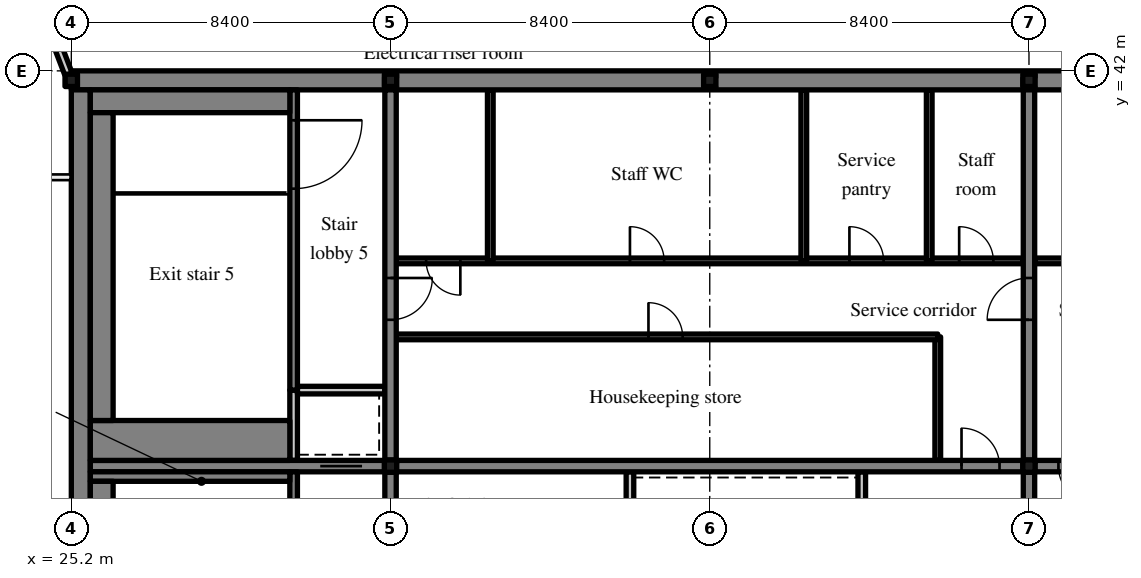
"""IFC4 building model, lengths in metres.
Left out: names, types, materials, properties, quantities, classifications, styles, units other than length and angle.
Written with IfcOpenShell. Run it as: python <this file> out.ifc"""

import sys

from ifc_helpers import new_model, si_unit, direction, frame, frame_2d, origin, origin_2d, place, context, subcontext, project, spatial, rectangle, hollow_circle, extrude, source, transform, mapped, element, fill, save


model = new_model("IFC4")
c1 = context("Model", 3, precision=1e-05, world=origin(), true_north=direction((0.0, 1.0)))
c2 = subcontext(c1, "Body", "Model", "MODEL_VIEW")
j1 = project(units=[si_unit("LENGTHUNIT", "METRE"), si_unit("PLANEANGLEUNIT", "RADIAN")], contexts=[c1])
p1 = place(None, origin())
s1 = spatial("IfcSite", under=j1, at=p1, CompositionType="ELEMENT")
p2 = place(p1, origin())
s2 = spatial("IfcBuilding", under=s1, at=p2, CompositionType="ELEMENT")
p3 = place(p2, frame((0.0, 0.0, 329.7)))
s3 = spatial("IfcBuildingStorey", under=s2, at=p3, CompositionType="ELEMENT", Elevation=329.7)
m1 = source(origin(), c2, "Body", "SweptSolid", [
    extrude(rectangle(XDim=50.4, YDim=0.5, at=frame_2d((25.2, 0.0))), origin(), (0.0, 0.0, 1.0), 4.72),
])
p4 = place(p3, frame((25.2, 41.75, 0.0), z_axis=(0.0, 0.0, 1.0), x_axis=(1.0, 0.0, 0.0)))
e1 = element("IfcWall", 1, at=p4, inside=s3, PredefinedType="SHEAR", context=c2, shape_type="MappedRepresentation", body=[
    mapped(m1, transform((0.0, 0.0, 0.0), scale=1.0)),
])
m2 = source(origin(), c2, "Body", "SweptSolid", [
    extrude(rectangle(XDim=19.0, YDim=0.5, at=frame_2d((9.5, 0.0))), origin(), (0.0, 0.0, 1.0), 4.72),
])
p5 = place(p3, frame((25.45, 22.5, 0.0), z_axis=(0.0, 0.0, 1.0), x_axis=(0.0, 1.0, 0.0)))
e2 = element("IfcWall", 2, at=p5, inside=s3, PredefinedType="SHEAR", context=c2, shape_type="MappedRepresentation", body=[
    mapped(m2, transform((0.0, 0.0, 0.0), scale=1.0)),
])
m3 = source(origin(), c2, "Body", "SweptSolid", [
    extrude(rectangle(XDim=19.0, YDim=0.3, at=frame_2d((9.5, 0.0))), origin(), (0.0, 0.0, 1.0), 4.72),
])
p6 = place(p3, frame((33.6, 22.5, 0.0), z_axis=(0.0, 0.0, 1.0), x_axis=(0.0, 1.0, 0.0)))
e3 = element("IfcWall", 3, at=p6, inside=s3, PredefinedType="SHEAR", context=c2, shape_type="MappedRepresentation", body=[
    mapped(m3, transform((0.0, 0.0, 0.0), scale=1.0)),
])
m4 = source(origin(), c2, "Body", "SweptSolid", [
    extrude(rectangle(XDim=1.1, YDim=2.1, at=frame_2d((0.55, 1.05))), frame((0.0, 0.16, 0.0), z_axis=(0.0, -1.0, 0.0), x_axis=(1.0, 0.0, 0.0)), (0.0, 0.0, 1.0), 0.32),
])
p7 = place(p6, frame((12.95, 0.0, 0.0)))
e4 = element("IfcOpeningElement", 4, at=p7, cuts=e3, PredefinedType="OPENING", context=c2, shape_type="MappedRepresentation", body=[
    mapped(m4, transform((0.0, 0.0, 0.0), scale=1.0)),
])
p8 = place(p3, frame((50.4, 22.5, 0.0), z_axis=(0.0, 0.0, 1.0), x_axis=(0.0, 1.0, 0.0)))
e5 = element("IfcWall", 5, at=p8, inside=s3, PredefinedType="SHEAR", context=c2, shape_type="MappedRepresentation", body=[
    mapped(m3, transform((0.0, 0.0, 0.0), scale=1.0)),
])
p9 = place(p8, frame((12.95, 0.0, 0.0)))
e6 = element("IfcOpeningElement", 6, at=p9, cuts=e5, PredefinedType="OPENING", context=c2, shape_type="MappedRepresentation", body=[
    mapped(m4, transform((0.0, 0.0, 0.0), scale=1.0)),
])
m5 = source(origin(), c2, "Body", "SweptSolid", [
    extrude(rectangle(XDim=7.75, YDim=0.3, at=frame_2d((3.875, 0.0))), origin(), (0.0, 0.0, 1.0), 4.72),
])
p10 = place(p3, frame((25.7, 31.6, 0.0), z_axis=(0.0, 0.0, 1.0), x_axis=(1.0, 0.0, 0.0)))
e7 = element("IfcWall", 7, at=p10, inside=s3, PredefinedType="SHEAR", context=c2, shape_type="MappedRepresentation", body=[
    mapped(m5, transform((0.0, 0.0, 0.0), scale=1.0)),
])
p11 = place(p10, frame((6.05, 0.0, 0.0)))
e8 = element("IfcOpeningElement", 8, at=p11, cuts=e7, PredefinedType="OPENING", context=c2, shape_type="MappedRepresentation", body=[
    mapped(m4, transform((0.0, 0.0, 0.0), scale=1.0)),
])
m6 = source(origin(), c2, "Body", "SweptSolid", [
    extrude(rectangle(XDim=16.5, YDim=0.3, at=frame_2d((8.25, 0.0))), origin(), (0.0, 0.0, 1.0), 4.72),
])
p12 = place(p3, frame((33.75, 31.6, 0.0), z_axis=(0.0, 0.0, 1.0), x_axis=(1.0, 0.0, 0.0)))
e9 = element("IfcWall", 9, at=p12, inside=s3, PredefinedType="SHEAR", context=c2, shape_type="MappedRepresentation", body=[
    mapped(m6, transform((0.0, 0.0, 0.0), scale=1.0)),
])
m7 = source(origin(), c2, "Body", "SweptSolid", [
    extrude(rectangle(XDim=1.0, YDim=2.1, at=frame_2d((0.5, 1.05))), frame((0.0, 0.16, 0.0), z_axis=(0.0, -1.0, 0.0), x_axis=(1.0, 0.0, 0.0)), (0.0, 0.0, 1.0), 0.32),
])
p13 = place(p12, frame((14.875, 0.0, 0.0)))
e10 = element("IfcOpeningElement", 10, at=p13, cuts=e9, PredefinedType="OPENING", context=c2, shape_type="MappedRepresentation", body=[
    mapped(m7, transform((0.0, 0.0, 0.0), scale=1.0)),
])
p14 = place(p3, frame((50.55, 31.6, 0.0), z_axis=(0.0, 0.0, 1.0), x_axis=(1.0, 0.0, 0.0)))
e11 = element("IfcWall", 11, at=p14, inside=s3, PredefinedType="SHEAR", context=c2, shape_type="MappedRepresentation", body=[
    mapped(m6, transform((0.0, 0.0, 0.0), scale=1.0)),
])
p15 = place(p14, frame((0.625, 0.0, 0.0)))
e12 = element("IfcOpeningElement", 12, at=p15, cuts=e11, PredefinedType="OPENING", context=c2, shape_type="MappedRepresentation", body=[
    mapped(m7, transform((0.0, 0.0, 0.0), scale=1.0)),
])
m8 = source(origin(), c2, "Body", "SweptSolid", [
    extrude(hollow_circle(Radius=0.162, WallThickness=0.012, at=origin_2d()), origin(), (0.0, 0.0, 1.0), 4.4),
])
for number, where, z_axis, x_axis in (
    (13, (25.2, 41.75, 5.0), (0.0, 0.0, 1.0), (1.0, 0.0, 0.0)),
    (14, (33.6, 41.75, 5.0), (0.0, 0.0, 1.0), (1.0, 0.0, 0.0)),
    (15, (42.0, 41.75, 5.0), (0.0, 0.0, 1.0), (1.0, 0.0, 0.0)),
    (16, (50.4, 41.75, 5.0), (0.0, 0.0, 1.0), (1.0, 0.0, 0.0)),
    (17, (33.6, 31.6, 5.0), (0.0, 0.0, 1.0), (1.0, 0.0, 0.0)),
    (18, (50.4, 31.6, 5.0), (0.0, 0.0, 1.0), (1.0, 0.0, 0.0)),
):
    element("IfcColumn", number, at=place(p3, frame(where, z_axis=z_axis, x_axis=x_axis)), inside=s3, PredefinedType="COLUMN", context=c2, shape_type="MappedRepresentation", body=[
        mapped(m8, transform((0.0, 0.0, 0.0), scale=1.0)),
    ])
m9 = source(origin(), c2, "Body", "SweptSolid", [
    extrude(rectangle(XDim=1.655, YDim=0.2, at=frame_2d((0.827, 0.0))), origin(), (0.0, 0.0, 1.0), 1.1),
])
p16 = place(p3, frame((24.539, 43.445, 0.0), z_axis=(0.0, 0.0, 1.0), x_axis=(0.357614417071, -0.933869331707, 0.0)))
e19 = element("IfcWall", 19, at=p16, inside=s3, PredefinedType="PARAPET", context=c2, shape_type="MappedRepresentation", body=[
    mapped(m9, transform((0.0, 0.0, 0.0), scale=1.0)),
])
m10 = source(origin(), c2, "Body", "SweptSolid", [
    extrude(rectangle(XDim=8.95, YDim=0.2, at=frame_2d((4.475, 0.0))), origin(), (0.0, 0.0, 1.0), 4.72),
])
p17 = place(p3, frame((39.9, 22.5, 0.0), z_axis=(0.0, 0.0, 1.0), x_axis=(0.0, 1.0, 0.0)))
e20 = element("IfcWall", 20, at=p17, inside=s3, PredefinedType="PARTITIONING", context=c2, shape_type="MappedRepresentation", body=[
    mapped(m10, transform((0.0, 0.0, 0.0), scale=1.0)),
])
m11 = source(origin(), c2, "Body", "SweptSolid", [
    extrude(rectangle(XDim=0.9, YDim=2.1, at=frame_2d((0.45, 1.05))), frame((0.0, 0.11, 0.0), z_axis=(0.0, -1.0, 0.0), x_axis=(1.0, 0.0, 0.0)), (0.0, 0.0, 1.0), 0.22),
])
p18 = place(p17, frame((4.05, 0.0, 0.0)))
e21 = element("IfcOpeningElement", 21, at=p18, cuts=e20, PredefinedType="OPENING", context=c2, shape_type="MappedRepresentation", body=[
    mapped(m11, transform((0.0, 0.0, 0.0), scale=1.0)),
])
m12 = source(origin(), c2, "Body", "SweptSolid", [
    extrude(rectangle(XDim=2.65, YDim=0.2, at=frame_2d((1.325, 0.0))), origin(), (0.0, 0.0, 1.0), 4.72),
])
p19 = place(p3, frame((46.0, 28.8, 0.0), z_axis=(0.0, 0.0, 1.0), x_axis=(0.0, 1.0, 0.0)))
e22 = element("IfcWall", 22, at=p19, inside=s3, PredefinedType="SOLIDWALL", context=c2, shape_type="MappedRepresentation", body=[
    mapped(m12, transform((0.0, 0.0, 0.0), scale=1.0)),
])
m13 = source(origin(), c2, "Body", "SweptSolid", [
    extrude(rectangle(XDim=3.25, YDim=0.15, at=frame_2d((1.625, 0.0))), origin(), (0.0, 0.0, 1.0), 4.72),
])
p20 = place(p3, frame((48.0, 31.75, 0.0), z_axis=(0.0, 0.0, 1.0), x_axis=(0.0, 1.0, 0.0)))
e23 = element("IfcWall", 23, at=p20, inside=s3, PredefinedType="PARTITIONING", context=c2, shape_type="MappedRepresentation", body=[
    mapped(m13, transform((0.0, 0.0, 0.0), scale=1.0)),
])
m14 = source(origin(), c2, "Body", "SweptSolid", [
    extrude(rectangle(XDim=14.25, YDim=0.15, at=frame_2d((7.125, 0.0))), origin(), (0.0, 0.0, 1.0), 4.72),
])
p21 = place(p3, frame((33.75, 35.0, 0.0), z_axis=(0.0, 0.0, 1.0), x_axis=(1.0, 0.0, 0.0)))
e24 = element("IfcWall", 24, at=p21, inside=s3, PredefinedType="PARTITIONING", context=c2, shape_type="MappedRepresentation", body=[
    mapped(m14, transform((0.0, 0.0, 0.0), scale=1.0)),
])
m15 = source(origin(), c2, "Body", "SweptSolid", [
    extrude(rectangle(XDim=0.9, YDim=2.1, at=frame_2d((0.45, 1.05))), frame((0.0, 0.085, 0.0), z_axis=(0.0, -1.0, 0.0), x_axis=(1.0, 0.0, 0.0)), (0.0, 0.0, 1.0), 0.17),
])
p22 = place(p21, frame((6.637, 0.0, 0.0)))
e25 = element("IfcOpeningElement", 25, at=p22, cuts=e24, PredefinedType="OPENING", context=c2, shape_type="MappedRepresentation", body=[
    mapped(m15, transform((0.0, 0.0, 0.0), scale=1.0)),
])
m16 = source(origin(), c2, "Body", "SweptSolid", [
    extrude(rectangle(XDim=16.5, YDim=0.15, at=frame_2d((8.25, 0.0))), origin(), (0.0, 0.0, 1.0), 4.72),
])
p23 = place(p3, frame((33.75, 37.0, 0.0), z_axis=(0.0, 0.0, 1.0), x_axis=(1.0, 0.0, 0.0)))
e26 = element("IfcWall", 26, at=p23, inside=s3, PredefinedType="PARTITIONING", context=c2, shape_type="MappedRepresentation", body=[
    mapped(m16, transform((0.0, 0.0, 0.0), scale=1.0)),
])
p24 = place(p23, frame((0.787, 0.0, 0.0)))
e27 = element("IfcOpeningElement", 27, at=p24, cuts=e26, PredefinedType="OPENING", context=c2, shape_type="MappedRepresentation", body=[
    mapped(m15, transform((0.0, 0.0, 0.0), scale=1.0)),
])
p25 = place(p23, frame((6.15, 0.0, 0.0)))
e28 = element("IfcOpeningElement", 28, at=p25, cuts=e26, PredefinedType="OPENING", context=c2, shape_type="MappedRepresentation", body=[
    mapped(m15, transform((0.0, 0.0, 0.0), scale=1.0)),
])
p26 = place(p23, frame((11.925, 0.0, 0.0)))
e29 = element("IfcOpeningElement", 29, at=p26, cuts=e26, PredefinedType="OPENING", context=c2, shape_type="MappedRepresentation", body=[
    mapped(m15, transform((0.0, 0.0, 0.0), scale=1.0)),
])
p27 = place(p23, frame((14.813, 0.0, 0.0)))
e30 = element("IfcOpeningElement", 30, at=p27, cuts=e26, PredefinedType="OPENING", context=c2, shape_type="MappedRepresentation", body=[
    mapped(m15, transform((0.0, 0.0, 0.0), scale=1.0)),
])
m17 = source(origin(), c2, "Body", "SweptSolid", [
    extrude(rectangle(XDim=4.5, YDim=0.15, at=frame_2d((2.25, 0.0))), origin(), (0.0, 0.0, 1.0), 4.72),
])
for number, where, z_axis, x_axis in (
    (31, (36.225, 37.0, 0.0), (0.0, 0.0, 1.0), (0.0, 1.0, 0.0)),
    (32, (44.475, 37.0, 0.0), (0.0, 0.0, 1.0), (0.0, 1.0, 0.0)),
    (33, (47.775, 37.0, 0.0), (0.0, 0.0, 1.0), (0.0, 1.0, 0.0)),
):
    element("IfcWall", number, at=place(p3, frame(where, z_axis=z_axis, x_axis=x_axis)), inside=s3, PredefinedType="PARTITIONING", context=c2, shape_type="MappedRepresentation", body=[
        mapped(m17, transform((0.0, 0.0, 0.0), scale=1.0)),
    ])
p28 = place(p3, frame((67.05, 37.0, 0.0), z_axis=(0.0, 0.0, 1.0), x_axis=(-1.0, 0.0, 0.0)))
e34 = element("IfcWall", 34, at=p28, inside=s3, PredefinedType="PARTITIONING", context=c2, shape_type="MappedRepresentation", body=[
    mapped(m16, transform((0.0, 0.0, 0.0), scale=1.0)),
])
p29 = place(p28, frame((0.788, 0.0, 0.0)))
e35 = element("IfcOpeningElement", 35, at=p29, cuts=e34, PredefinedType="OPENING", context=c2, shape_type="MappedRepresentation", body=[
    mapped(m15, transform((0.0, 0.0, 0.0), scale=1.0)),
])
p30 = place(p28, frame((9.038, 0.0, 0.0)))
e36 = element("IfcOpeningElement", 36, at=p30, cuts=e34, PredefinedType="OPENING", context=c2, shape_type="MappedRepresentation", body=[
    mapped(m15, transform((0.0, 0.0, 0.0), scale=1.0)),
])
m18 = source(origin(), c2, "Body", "SweptSolid", [
    extrude(rectangle(XDim=8.95, YDim=0.2, at=frame_2d((4.475, 0.0))), origin(), (0.0, 0.0, 1.0), 4.72),
])
p31 = place(p3, frame((31.05, 22.5, 0.0), z_axis=(0.0, 0.0, 1.0), x_axis=(0.0, 1.0, 0.0)))
e37 = element("IfcWall", 37, at=p31, inside=s3, PredefinedType="SOLIDWALL", context=c2, shape_type="MappedRepresentation", body=[
    mapped(m18, transform((0.0, 0.0, 0.0), scale=1.0)),
])
m19 = source(origin(), c2, "Body", "SweptSolid", [
    extrude(rectangle(XDim=1.2, YDim=2.1, at=frame_2d((0.6, 1.05))), frame((0.0, 0.11, 0.0), z_axis=(0.0, -1.0, 0.0), x_axis=(1.0, 0.0, 0.0)), (0.0, 0.0, 1.0), 0.22),
])
p32 = place(p31, frame((7.0, 0.0, 0.0)))
e38 = element("IfcOpeningElement", 38, at=p32, cuts=e37, PredefinedType="OPENING", context=c2, shape_type="MappedRepresentation", body=[
    mapped(m19, transform((0.0, 0.0, 0.0), scale=1.0)),
])
m20 = source(origin(), c2, "Body", "SweptSolid", [
    extrude(rectangle(XDim=1.85, YDim=0.2, at=frame_2d((0.925, 0.0))), origin(), (0.0, 0.0, 1.0), 4.72),
])
p33 = place(p3, frame((31.05, 31.75, 0.0), z_axis=(0.0, 0.0, 1.0), x_axis=(0.0, 1.0, 0.0)))
e39 = element("IfcWall", 39, at=p33, inside=s3, PredefinedType="SOLIDWALL", context=c2, shape_type="MappedRepresentation", body=[
    mapped(m20, transform((0.0, 0.0, 0.0), scale=1.0)),
])
m21 = source(origin(), c2, "Body", "SweptSolid", [
    extrude(rectangle(XDim=2.3, YDim=0.2, at=frame_2d((1.15, 0.0))), origin(), (0.0, 0.0, 1.0), 4.72),
])
p34 = place(p3, frame((31.15, 33.6, 0.0), z_axis=(0.0, 0.0, 1.0), x_axis=(1.0, 0.0, 0.0)))
e40 = element("IfcWall", 40, at=p34, inside=s3, PredefinedType="SOLIDWALL", context=c2, shape_type="MappedRepresentation", body=[
    mapped(m21, transform((0.0, 0.0, 0.0), scale=1.0)),
])
m22 = source(origin(), c2, "Body", "SweptSolid", [
    extrude(rectangle(XDim=7.9, YDim=0.2, at=frame_2d((3.95, 0.0))), origin(), (0.0, 0.0, 1.0), 4.72),
])
p35 = place(p3, frame((31.05, 33.6, 0.0), z_axis=(0.0, 0.0, 1.0), x_axis=(0.0, 1.0, 0.0)))
e41 = element("IfcWall", 41, at=p35, inside=s3, PredefinedType="SOLIDWALL", context=c2, shape_type="MappedRepresentation", body=[
    mapped(m22, transform((0.0, 0.0, 0.0), scale=1.0)),
])
m23 = source(origin(), c2, "Body", "SweptSolid", [
    extrude(rectangle(XDim=1.8, YDim=2.1, at=frame_2d((0.9, 1.05))), frame((0.0, 0.11, 0.0), z_axis=(0.0, -1.0, 0.0), x_axis=(1.0, 0.0, 0.0)), (0.0, 0.0, 1.0), 0.22),
])
p36 = place(p35, frame((5.3, 0.0, 0.0)))
e42 = element("IfcOpeningElement", 42, at=p36, cuts=e41, PredefinedType="OPENING", context=c2, shape_type="MappedRepresentation", body=[
    mapped(m23, transform((0.0, 0.0, 0.0), scale=1.0)),
])
m24 = source(origin(), c2, "Body", "SweptSolid", [
    extrude(rectangle(XDim=5.25, YDim=0.25, at=frame_2d((2.625, 0.0))), origin(), (0.0, 0.0, 1.0), 4.72),
])
p37 = place(p3, frame((25.7, 31.325, 0.0), z_axis=(0.0, 0.0, 1.0), x_axis=(1.0, 0.0, 0.0)))
e43 = element("IfcWall", 43, at=p37, inside=s3, PredefinedType="SOLIDWALL", context=c2, shape_type="MappedRepresentation", body=[
    mapped(m24, transform((0.0, 0.0, 0.0), scale=1.0)),
])
m25 = source(origin(), c2, "Body", "SweptSolid", [
    extrude(rectangle(XDim=8.1, YDim=0.6, at=frame_2d((4.05, 0.0))), origin(), (0.0, 0.0, 1.0), 4.72),
])
p38 = place(p3, frame((26.0, 23.1, 0.0), z_axis=(0.0, 0.0, 1.0), x_axis=(0.0, 1.0, 0.0)))
e44 = element("IfcWall", 44, at=p38, inside=s3, PredefinedType="SOLIDWALL", context=c2, shape_type="MappedRepresentation", body=[
    mapped(m25, transform((0.0, 0.0, 0.0), scale=1.0)),
])
m26 = source(origin(), c2, "Body", "SweptSolid", [
    extrude(rectangle(XDim=5.25, YDim=0.6, at=frame_2d((2.625, 0.0))), origin(), (0.0, 0.0, 1.0), 4.72),
])
p39 = place(p3, frame((25.7, 41.2, 0.0), z_axis=(0.0, 0.0, 1.0), x_axis=(1.0, 0.0, 0.0)))
e45 = element("IfcWall", 45, at=p39, inside=s3, PredefinedType="SOLIDWALL", context=c2, shape_type="MappedRepresentation", body=[
    mapped(m26, transform((0.0, 0.0, 0.0), scale=1.0)),
])
m27 = source(origin(), c2, "Body", "SweptSolid", [
    extrude(rectangle(XDim=5.25, YDim=1.05, at=frame_2d((2.625, 0.0))), origin(), (0.0, 0.0, 1.0), 4.72),
])
p40 = place(p3, frame((25.7, 32.275, 0.0), z_axis=(0.0, 0.0, 1.0), x_axis=(1.0, 0.0, 0.0)))
e46 = element("IfcWall", 46, at=p40, inside=s3, PredefinedType="SOLIDWALL", context=c2, shape_type="MappedRepresentation", body=[
    mapped(m27, transform((0.0, 0.0, 0.0), scale=1.0)),
])
p41 = place(p3, frame((26.0, 32.8, 0.0), z_axis=(0.0, 0.0, 1.0), x_axis=(0.0, 1.0, 0.0)))
e47 = element("IfcWall", 47, at=p41, inside=s3, PredefinedType="SOLIDWALL", context=c2, shape_type="MappedRepresentation", body=[
    mapped(m25, transform((0.0, 0.0, 0.0), scale=1.0)),
])
m28 = source(origin(), c2, "Body", "SweptSolid", [
    extrude(rectangle(XDim=1.0, YDim=2.1, at=frame_2d((0.5, 1.05))), frame((0.0, 0.025, 0.0), z_axis=(0.0, -1.0, 0.0), x_axis=(1.0, 0.0, 0.0)), (0.0, 0.0, 1.0), 0.05),
])
p42 = place(p13, origin())
e48 = element("IfcDoor", 48, at=p42, inside=s3, OperationType="SINGLE_SWING_LEFT", PredefinedType="DOOR", context=c2, shape_type="MappedRepresentation", body=[
    mapped(m28, transform((0.0, 0.0, 0.0), scale=1.0)),
])
fill(e10, e48)
m29 = source(origin(), c2, "Body", "SweptSolid", [
    extrude(rectangle(XDim=0.9, YDim=2.1, at=frame_2d((0.45, 1.05))), frame((0.0, 0.025, 0.0), z_axis=(0.0, -1.0, 0.0), x_axis=(1.0, 0.0, 0.0)), (0.0, 0.0, 1.0), 0.05),
])
p43 = place(p22, origin())
e49 = element("IfcDoor", 49, at=p43, inside=s3, OperationType="SINGLE_SWING_LEFT", PredefinedType="DOOR", context=c2, shape_type="MappedRepresentation", body=[
    mapped(m29, transform((0.0, 0.0, 0.0), scale=1.0)),
])
fill(e25, e49)
p44 = place(p24, origin())
e50 = element("IfcDoor", 50, at=p44, inside=s3, OperationType="SINGLE_SWING_RIGHT", PredefinedType="DOOR", context=c2, shape_type="MappedRepresentation", body=[
    mapped(m29, transform((0.0, 0.0, 0.0), scale=1.0)),
])
fill(e27, e50)
p45 = place(p25, origin())
e51 = element("IfcDoor", 51, at=p45, inside=s3, OperationType="SINGLE_SWING_LEFT", PredefinedType="DOOR", context=c2, shape_type="MappedRepresentation", body=[
    mapped(m29, transform((0.0, 0.0, 0.0), scale=1.0)),
])
fill(e28, e51)
p46 = place(p26, origin())
e52 = element("IfcDoor", 52, at=p46, inside=s3, OperationType="SINGLE_SWING_LEFT", PredefinedType="DOOR", context=c2, shape_type="MappedRepresentation", body=[
    mapped(m29, transform((0.0, 0.0, 0.0), scale=1.0)),
])
fill(e29, e52)
p47 = place(p27, origin())
e53 = element("IfcDoor", 53, at=p47, inside=s3, OperationType="SINGLE_SWING_LEFT", PredefinedType="DOOR", context=c2, shape_type="MappedRepresentation", body=[
    mapped(m29, transform((0.0, 0.0, 0.0), scale=1.0)),
])
fill(e30, e53)
p48 = place(p15, origin())
e54 = element("IfcDoor", 54, at=p48, inside=s3, OperationType="SINGLE_SWING_RIGHT", PredefinedType="DOOR", context=c2, shape_type="MappedRepresentation", body=[
    mapped(m28, transform((0.0, 0.0, 0.0), scale=1.0)),
])
fill(e12, e54)
m30 = source(origin(), c2, "Body", "SweptSolid", [
    extrude(rectangle(XDim=1.1, YDim=2.1, at=frame_2d((0.55, 1.05))), frame((0.0, 0.025, 0.0), z_axis=(0.0, -1.0, 0.0), x_axis=(1.0, 0.0, 0.0)), (0.0, 0.0, 1.0), 0.05),
])
p49 = place(p11, origin())
e55 = element("IfcDoor", 55, at=p49, inside=s3, OperationType="SLIDING_TO_LEFT", PredefinedType="DOOR", context=c2, shape_type="MappedRepresentation", body=[
    mapped(m30, transform((0.0, 0.0, 0.0), scale=1.0)),
])
fill(e8, e55)
m31 = source(origin(), c2, "Body", "SweptSolid", [
    extrude(rectangle(XDim=1.8, YDim=2.1, at=frame_2d((0.9, 1.05))), frame((0.0, 0.025, 0.0), z_axis=(0.0, -1.0, 0.0), x_axis=(1.0, 0.0, 0.0)), (0.0, 0.0, 1.0), 0.05),
])
p50 = place(p36, origin())
e56 = element("IfcDoor", 56, at=p50, inside=s3, OperationType="SINGLE_SWING_RIGHT", PredefinedType="DOOR", context=c2, shape_type="MappedRepresentation", body=[
    mapped(m31, transform((0.0, 0.0, 0.0), scale=1.0)),
])
fill(e42, e56)
p51 = place(p7, origin())
e57 = element("IfcDoor", 57, at=p51, inside=s3, OperationType="SINGLE_SWING_RIGHT", PredefinedType="DOOR", context=c2, shape_type="MappedRepresentation", body=[
    mapped(m30, transform((0.0, 0.0, 0.0), scale=1.0)),
])
fill(e4, e57)
p52 = place(p9, origin())
e58 = element("IfcDoor", 58, at=p52, inside=s3, OperationType="SINGLE_SWING_LEFT", PredefinedType="DOOR", context=c2, shape_type="MappedRepresentation", body=[
    mapped(m30, transform((0.0, 0.0, 0.0), scale=1.0)),
])
fill(e6, e58)
save(model, sys.argv[1])
